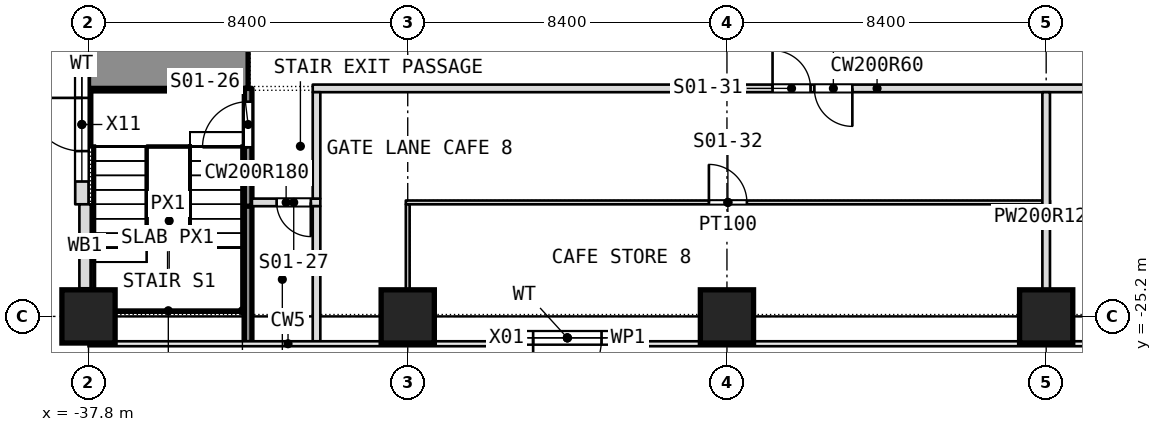
"""IFC4 building model, lengths in metres.
Left out: names, types, materials, properties, quantities, classifications, styles, units other than length and angle.
Written with IfcOpenShell. Run it as: python <this file> out.ifc"""

import sys

from ifc_helpers import new_model, si_unit, direction, frame, frame_2d, origin, origin_2d, place, context, subcontext, project, spatial, rectangle, extrude, element, fill, save


model = new_model("IFC4")
c1 = context("Model", 3, precision=1e-05, world=origin(), true_north=direction((0.0, 1.0)))
c2 = subcontext(c1, "Body", "Model", "MODEL_VIEW")
j1 = project(units=[si_unit("LENGTHUNIT", "METRE"), si_unit("PLANEANGLEUNIT", "RADIAN")], contexts=[c1])
p1 = place(None, origin())
s1 = spatial("IfcSite", under=j1, at=p1, CompositionType="ELEMENT")
p2 = place(p1, origin())
s2 = spatial("IfcBuilding", under=s1, at=p2, CompositionType="ELEMENT")
p3 = place(p2, origin())
s3 = spatial("IfcBuildingStorey", under=s2, at=p3, CompositionType="ELEMENT", Elevation=0.0)
for number, where, z_axis, x_axis in (
    (1, (-37.8, -25.2, -0.3), (0.0, 0.0, 1.0), (1.0, 0.0, 0.0)),
    (2, (-29.4, -25.2, -0.3), (0.0, 0.0, 1.0), (1.0, 0.0, 0.0)),
    (3, (-21.0, -25.2, -0.3), (0.0, 0.0, 1.0), (1.0, 0.0, 0.0)),
    (4, (-12.6, -25.2, -0.3), (0.0, 0.0, 1.0), (1.0, 0.0, 0.0)),
):
    element("IfcColumn", number, at=place(p3, frame(where, z_axis=z_axis, x_axis=x_axis)), inside=s3, PredefinedType="COLUMN", context=c2, shape_type="SweptSolid", body=[
        extrude(rectangle(XDim=1.4, YDim=1.4, at=origin_2d()), origin(), (0.0, 0.0, 1.0), 8.3),
    ])
p4 = place(p3, frame((-37.8, -18.0, -0.3), z_axis=(0.0, 0.0, 1.0), x_axis=(1.0, 0.0, 0.0)))
e5 = element("IfcWall", 5, at=p4, inside=s3, PredefinedType="SOLIDWALL", context=c2, shape_type="SweptSolid", body=[
    extrude(rectangle(XDim=4.2, YDim=2.4, at=frame_2d((2.1, 0.0))), origin(), (0.0, 0.0, 1.0), 8.3),
])
p5 = place(p3, frame((-33.5, -22.2, 0.0), z_axis=(0.0, 0.0, 1.0), x_axis=(1.0, 0.0, 0.0)))
e6 = element("IfcWall", 6, at=p5, inside=s3, PredefinedType="PARTITIONING", context=c2, shape_type="SweptSolid", body=[
    extrude(rectangle(XDim=1.8, YDim=0.2, at=frame_2d((0.9, 0.0))), origin(), (0.0, 0.0, 1.0), 7.68),
])
p6 = place(p5, frame((0.65, 0.0, 0.0)))
e7 = element("IfcOpeningElement", 7, at=p6, cuts=e6, PredefinedType="OPENING", context=c2, shape_type="SweptSolid", body=[
    extrude(rectangle(XDim=0.9, YDim=2.1, at=frame_2d((0.45, 1.05))), frame((0.0, 0.1, 0.0), z_axis=(0.0, -1.0, 0.0), x_axis=(1.0, 0.0, 0.0)), (0.0, 0.0, 1.0), 0.2),
])
p7 = place(p3, frame((-29.45, -22.2, 0.0), z_axis=(0.0, 0.0, 1.0), x_axis=(1.0, 0.0, 0.0)))
e8 = element("IfcWall", 8, at=p7, inside=s3, PredefinedType="PARTITIONING", context=c2, shape_type="SweptSolid", body=[
    extrude(rectangle(XDim=16.95, YDim=0.1, at=frame_2d((8.475, 0.0))), origin(), (0.0, 0.0, 1.0), 7.68),
])
p8 = place(p7, frame((7.975, 0.0, 0.0)))
e9 = element("IfcOpeningElement", 9, at=p8, cuts=e8, PredefinedType="OPENING", context=c2, shape_type="SweptSolid", body=[
    extrude(rectangle(XDim=1.0, YDim=2.1, at=frame_2d((0.5, 1.05))), frame((0.0, 0.05, 0.0), z_axis=(0.0, -1.0, 0.0), x_axis=(1.0, 0.0, 0.0)), (0.0, 0.0, 1.0), 0.1),
])
p9 = place(p3, frame((-31.9, -19.2, 0.0), z_axis=(0.0, 0.0, 1.0), x_axis=(1.0, 0.0, 0.0)))
e10 = element("IfcWall", 10, at=p9, inside=s3, PredefinedType="PARTITIONING", context=c2, shape_type="SweptSolid", body=[
    extrude(rectangle(XDim=29.7, YDim=0.2, at=frame_2d((14.85, 0.0))), origin(), (0.0, 0.0, 1.0), 7.68),
])
p10 = place(p9, frame((13.2, 0.0, 0.0)))
e11 = element("IfcOpeningElement", 11, at=p10, cuts=e10, PredefinedType="OPENING", context=c2, shape_type="SweptSolid", body=[
    extrude(rectangle(XDim=1.0, YDim=2.1, at=frame_2d((0.5, 1.05))), frame((0.0, 0.1, 0.0), z_axis=(0.0, -1.0, 0.0), x_axis=(1.0, 0.0, 0.0)), (0.0, 0.0, 1.0), 0.2),
])
p11 = place(p9, frame((12.1, 0.0, 0.0)))
e12 = element("IfcOpeningElement", 12, at=p11, cuts=e10, PredefinedType="OPENING", context=c2, shape_type="SweptSolid", body=[
    extrude(rectangle(XDim=1.0, YDim=2.1, at=frame_2d((0.5, 1.05))), frame((0.0, 0.1, 0.0), z_axis=(0.0, -1.0, 0.0), x_axis=(1.0, 0.0, 0.0)), (0.0, 0.0, 1.0), 0.2),
])
p12 = place(p9, frame((23.95, 0.0, 0.0)))
e13 = element("IfcOpeningElement", 13, at=p12, cuts=e10, PredefinedType="OPENING", context=c2, shape_type="SweptSolid", body=[
    extrude(rectangle(XDim=1.0, YDim=2.1, at=frame_2d((0.5, 1.05))), frame((0.0, 0.1, 0.0), z_axis=(0.0, -1.0, 0.0), x_axis=(1.0, 0.0, 0.0)), (0.0, 0.0, 1.0), 0.2),
])
p13 = place(p3, frame((-12.6, -25.889, 0.0), z_axis=(0.0, 0.0, 1.0), x_axis=(0.0, 1.0, 0.0)))
e14 = element("IfcWall", 14, at=p13, inside=s3, PredefinedType="PARTITIONING", context=c2, shape_type="SweptSolid", body=[
    extrude(rectangle(XDim=6.589, YDim=0.2, at=frame_2d((3.294, 0.0))), origin(), (0.0, 0.0, 1.0), 7.68),
])
p14 = place(p3, frame((-29.4, -25.889, 0.0), z_axis=(0.0, 0.0, 1.0), x_axis=(0.0, 1.0, 0.0)))
e15 = element("IfcWall", 15, at=p14, inside=s3, PredefinedType="PARTITIONING", context=c2, shape_type="SweptSolid", body=[
    extrude(rectangle(XDim=3.639, YDim=0.1, at=frame_2d((1.819, 0.0))), origin(), (0.0, 0.0, 1.0), 7.68),
])
p15 = place(p3, frame((-31.8, -25.889, 0.0), z_axis=(0.0, 0.0, 1.0), x_axis=(0.0, 1.0, 0.0)))
e16 = element("IfcWall", 16, at=p15, inside=s3, PredefinedType="PARTITIONING", context=c2, shape_type="SweptSolid", body=[
    extrude(rectangle(XDim=3.589, YDim=0.2, at=frame_2d((1.794, 0.0))), origin(), (0.0, 0.0, 1.0), 7.68),
])
p16 = place(p3, frame((-31.8, -22.1, 0.0), z_axis=(0.0, 0.0, 1.0), x_axis=(0.0, 1.0, 0.0)))
e17 = element("IfcWall", 17, at=p16, inside=s3, PredefinedType="PARTITIONING", context=c2, shape_type="SweptSolid", body=[
    extrude(rectangle(XDim=2.8, YDim=0.2, at=frame_2d((1.4, 0.0))), origin(), (0.0, 0.0, 1.0), 7.68),
])
p17 = place(p3, frame((-33.6, -25.889, 0.0), z_axis=(0.0, 0.0, 1.0), x_axis=(0.0, 1.0, 0.0)))
e18 = element("IfcWall", 18, at=p17, inside=s3, PredefinedType="PARTITIONING", context=c2, shape_type="SweptSolid", body=[
    extrude(rectangle(XDim=3.789, YDim=0.2, at=frame_2d((1.895, 0.0))), origin(), (0.0, 0.0, 1.0), 7.68),
])
p18 = place(p3, frame((-33.6, -22.3, 0.0), z_axis=(0.0, 0.0, 1.0), x_axis=(0.0, 1.0, 0.0)))
e19 = element("IfcWall", 19, at=p18, inside=s3, PredefinedType="PARTITIONING", context=c2, shape_type="SweptSolid", body=[
    extrude(rectangle(XDim=3.1, YDim=0.2, at=frame_2d((1.55, 0.0))), origin(), (0.0, 0.0, 1.0), 7.68),
])
p19 = place(p18, frame((1.55, 0.0, 0.0)))
e20 = element("IfcOpeningElement", 20, at=p19, cuts=e19, PredefinedType="OPENING", context=c2, shape_type="SweptSolid", body=[
    extrude(rectangle(XDim=1.2, YDim=2.1, at=frame_2d((0.6, 1.05))), frame((0.0, 0.1, 0.0), z_axis=(0.0, -1.0, 0.0), x_axis=(1.0, 0.0, 0.0)), (0.0, 0.0, 1.0), 0.2),
])
p20 = place(p3, frame((-27.3, -25.764, 0.0), z_axis=(0.0, 0.0, 1.0), x_axis=(1.0, 0.0, 0.0)))
e21 = element("IfcWall", 21, at=p20, inside=s3, PredefinedType="NOTDEFINED", context=c2, shape_type="SweptSolid", body=[
    extrude(rectangle(XDim=4.2, YDim=0.35, at=frame_2d((2.1, 0.0))), origin(), (0.0, 0.0, 1.0), 8.0),
])
p21 = place(p20, frame((1.2, 0.0, 0.0)))
e22 = element("IfcOpeningElement", 22, at=p21, cuts=e21, PredefinedType="OPENING", context=c2, shape_type="SweptSolid", body=[
    extrude(rectangle(XDim=1.8, YDim=2.4, at=frame_2d((0.9, 1.2))), frame((0.0, 0.175, 0.0), z_axis=(0.0, -1.0, 0.0), x_axis=(1.0, 0.0, 0.0)), (0.0, 0.0, 1.0), 0.35),
])
p22 = place(p20, frame((0.6, 0.0, 2.9)))
e23 = element("IfcOpeningElement", 23, at=p22, cuts=e21, PredefinedType="OPENING", context=c2, shape_type="SweptSolid", body=[
    extrude(rectangle(XDim=3.0, YDim=2.6, at=frame_2d((1.5, 1.3))), frame((0.0, 0.175, 0.0), z_axis=(0.0, -1.0, 0.0), x_axis=(1.0, 0.0, 0.0)), (0.0, 0.0, 1.0), 0.35),
])
p23 = place(p3, frame((-37.975, -18.05, 0.0), z_axis=(0.0, 0.0, 1.0), x_axis=(0.0, -1.0, 0.0)))
e24 = element("IfcWall", 24, at=p23, inside=s3, PredefinedType="NOTDEFINED", context=c2, shape_type="SweptSolid", body=[
    extrude(rectangle(XDim=4.2, YDim=0.35, at=frame_2d((2.1, 0.0))), origin(), (0.0, 0.0, 1.0), 6.78),
])
p24 = place(p23, frame((1.4, 0.0, 0.0)))
e25 = element("IfcOpeningElement", 25, at=p24, cuts=e24, PredefinedType="OPENING", context=c2, shape_type="SweptSolid", body=[
    extrude(rectangle(XDim=1.4, YDim=2.2, at=frame_2d((0.7, 1.1))), frame((0.0, 0.175, 0.0), z_axis=(0.0, -1.0, 0.0), x_axis=(1.0, 0.0, 0.0)), (0.0, 0.0, 1.0), 0.35),
])
p25 = place(p23, frame((0.6, 0.0, 2.9)))
e26 = element("IfcOpeningElement", 26, at=p25, cuts=e24, PredefinedType="OPENING", context=c2, shape_type="SweptSolid", body=[
    extrude(rectangle(XDim=3.0, YDim=2.6, at=frame_2d((1.5, 1.3))), frame((0.0, 0.175, 0.0), z_axis=(0.0, -1.0, 0.0), x_axis=(1.0, 0.0, 0.0)), (0.0, 0.0, 1.0), 0.35),
])
p26 = place(p3, frame((-37.89, -22.25, 0.0), z_axis=(0.0, 0.0, 1.0), x_axis=(0.0, -1.0, 0.0)))
e27 = element("IfcWall", 27, at=p26, inside=s3, PredefinedType="NOTDEFINED", context=c2, shape_type="SweptSolid", body=[
    extrude(rectangle(XDim=2.21, YDim=0.3, at=frame_2d((1.105, 0.0))), origin(), (0.0, 0.0, 1.0), 6.78),
])
p27 = place(p6, origin())
e28 = element("IfcDoor", 28, at=p27, inside=s3, OperationType="SINGLE_SWING_LEFT", PredefinedType="DOOR", context=c2, shape_type="SweptSolid", body=[
    extrude(rectangle(XDim=0.9, YDim=2.1, at=frame_2d((0.45, 1.05))), frame((0.0, 0.025, 0.0), z_axis=(0.0, -1.0, 0.0), x_axis=(1.0, 0.0, 0.0)), (0.0, 0.0, 1.0), 0.05),
])
fill(e7, e28)
p28 = place(p8, origin())
e29 = element("IfcDoor", 29, at=p28, inside=s3, OperationType="SINGLE_SWING_RIGHT", PredefinedType="DOOR", context=c2, shape_type="SweptSolid", body=[
    extrude(rectangle(XDim=1.0, YDim=2.1, at=frame_2d((0.5, 1.05))), frame((0.0, 0.025, 0.0), z_axis=(0.0, -1.0, 0.0), x_axis=(1.0, 0.0, 0.0)), (0.0, 0.0, 1.0), 0.05),
])
fill(e9, e29)
p29 = place(p10, origin())
e30 = element("IfcDoor", 30, at=p29, inside=s3, OperationType="SINGLE_SWING_LEFT", PredefinedType="DOOR", context=c2, shape_type="SweptSolid", body=[
    extrude(rectangle(XDim=1.0, YDim=2.1, at=frame_2d((0.5, 1.05))), frame((0.0, 0.025, 0.0), z_axis=(0.0, -1.0, 0.0), x_axis=(1.0, 0.0, 0.0)), (0.0, 0.0, 1.0), 0.05),
])
fill(e11, e30)
p30 = place(p11, origin())
e31 = element("IfcDoor", 31, at=p30, inside=s3, OperationType="SINGLE_SWING_LEFT", PredefinedType="DOOR", context=c2, shape_type="SweptSolid", body=[
    extrude(rectangle(XDim=1.0, YDim=2.1, at=frame_2d((0.5, 1.05))), frame((0.0, 0.025, 0.0), z_axis=(0.0, -1.0, 0.0), x_axis=(1.0, 0.0, 0.0)), (0.0, 0.0, 1.0), 0.05),
])
fill(e12, e31)
p31 = place(p19, origin())
e32 = element("IfcDoor", 32, at=p31, inside=s3, OperationType="SINGLE_SWING_RIGHT", PredefinedType="DOOR", context=c2, shape_type="SweptSolid", body=[
    extrude(rectangle(XDim=1.2, YDim=2.1, at=frame_2d((0.6, 1.05))), frame((0.0, 0.025, 0.0), z_axis=(0.0, -1.0, 0.0), x_axis=(1.0, 0.0, 0.0)), (0.0, 0.0, 1.0), 0.05),
])
fill(e20, e32)
p32 = place(p21, frame((1.8, 0.0, 0.0), z_axis=(0.0, 0.0, 1.0), x_axis=(-1.0, 0.0, 0.0)))
e33 = element("IfcDoor", 33, at=p32, inside=s3, OperationType="DOUBLE_DOOR_DOUBLE_SWING", PredefinedType="DOOR", context=c2, shape_type="SweptSolid", body=[
    extrude(rectangle(XDim=1.8, YDim=2.4, at=frame_2d((0.9, 1.2))), frame((0.0, 0.025, 0.0), z_axis=(0.0, -1.0, 0.0), x_axis=(1.0, 0.0, 0.0)), (0.0, 0.0, 1.0), 0.05),
])
fill(e22, e33)
p33 = place(p22, origin())
e34 = element("IfcWindow", 34, at=p33, inside=s3, PartitioningType="SINGLE_PANEL", PredefinedType="WINDOW", context=c2, shape_type="SweptSolid", body=[
    extrude(rectangle(XDim=3.0, YDim=2.6, at=frame_2d((1.5, 1.3))), frame((0.0, 0.03, 0.0), z_axis=(0.0, -1.0, 0.0), x_axis=(1.0, 0.0, 0.0)), (0.0, 0.0, 1.0), 0.06),
])
fill(e23, e34)
p34 = place(p24, frame((1.4, 0.0, 0.0), z_axis=(0.0, 0.0, 1.0), x_axis=(-1.0, 0.0, 0.0)))
e35 = element("IfcDoor", 35, at=p34, inside=s3, OperationType="SINGLE_SWING_LEFT", PredefinedType="DOOR", context=c2, shape_type="SweptSolid", body=[
    extrude(rectangle(XDim=1.4, YDim=2.2, at=frame_2d((0.7, 1.1))), frame((0.0, 0.025, 0.0), z_axis=(0.0, -1.0, 0.0), x_axis=(1.0, 0.0, 0.0)), (0.0, 0.0, 1.0), 0.05),
])
fill(e25, e35)
p35 = place(p25, origin())
e36 = element("IfcWindow", 36, at=p35, inside=s3, PartitioningType="SINGLE_PANEL", PredefinedType="WINDOW", context=c2, shape_type="SweptSolid", body=[
    extrude(rectangle(XDim=3.0, YDim=2.6, at=frame_2d((1.5, 1.3))), frame((0.0, 0.03, 0.0), z_axis=(0.0, -1.0, 0.0), x_axis=(1.0, 0.0, 0.0)), (0.0, 0.0, 1.0), 0.06),
])
fill(e26, e36)
save(model, sys.argv[1])
